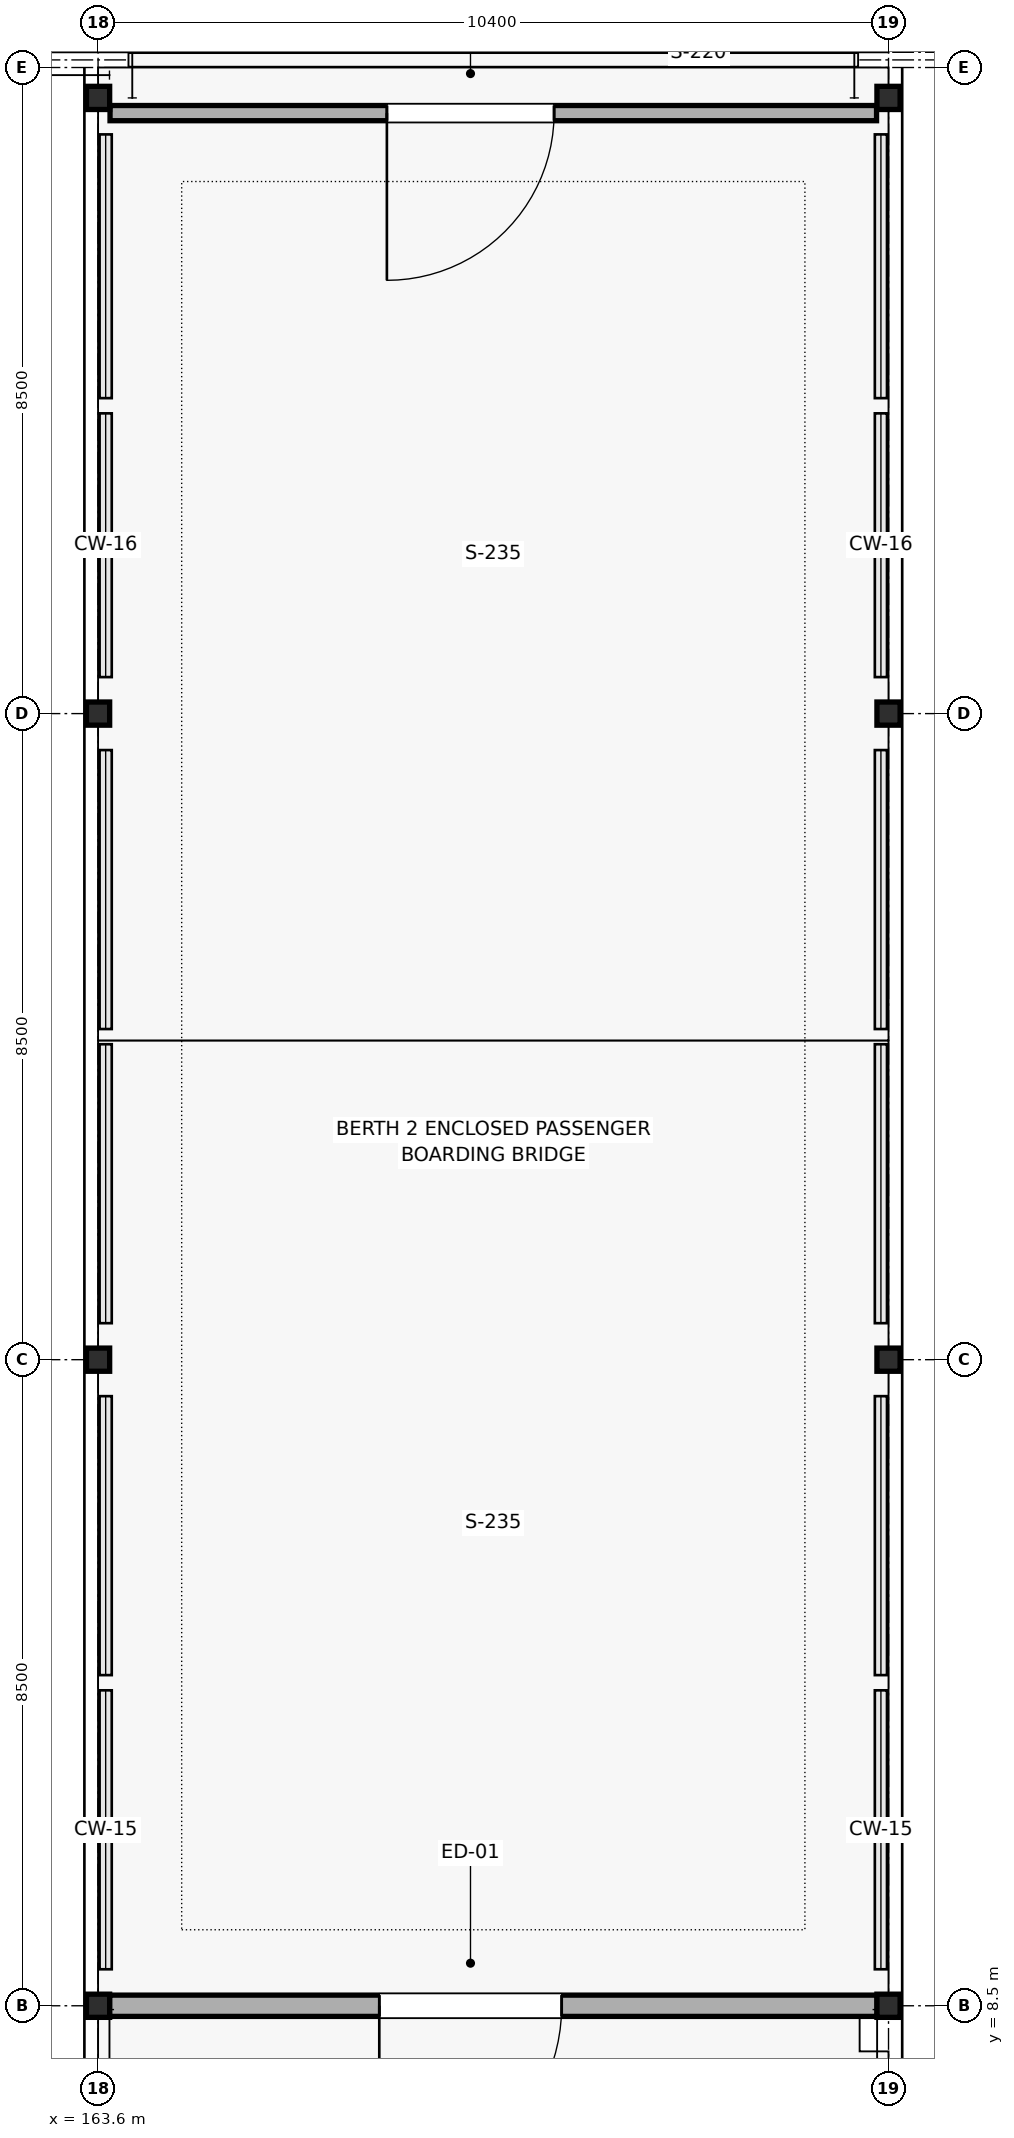
"""IFC4 building model, lengths in metres.
Left out: names, types, materials, properties, quantities, classifications, styles, units other than length and angle.
Written with IfcOpenShell. Run it as: python <this file> out.ifc"""

import sys

from ifc_helpers import new_model, si_unit, direction, frame, frame_2d, origin, origin_2d, place, context, subcontext, project, spatial, rectangle, hollow_rectangle, extrude, element, fill, save


model = new_model("IFC4")
c1 = context("Model", 3, precision=1e-05, world=origin(), true_north=direction((0.0, 1.0)))
c2 = subcontext(c1, "Body", "Model", "MODEL_VIEW")
j1 = project(units=[si_unit("LENGTHUNIT", "METRE"), si_unit("PLANEANGLEUNIT", "RADIAN")], contexts=[c1])
p1 = place(None, origin())
s1 = spatial("IfcSite", under=j1, at=p1, CompositionType="ELEMENT")
p2 = place(p1, origin())
s2 = spatial("IfcBuilding", under=s1, at=p2, CompositionType="ELEMENT")
p3 = place(p2, frame((0.0, 0.0, 5.4)))
s3 = spatial("IfcBuildingStorey", under=s2, at=p3, CompositionType="ELEMENT", Elevation=5.4)
for number, where, z_axis, x_axis in (
    (1, (163.6, 8.5, 0.0), (0.0, 0.0, 1.0), (1.0, 0.0, 0.0)),
    (2, (163.6, 17.0, 0.0), (0.0, 0.0, 1.0), (1.0, 0.0, 0.0)),
    (3, (163.6, 25.5, 0.0), (0.0, 0.0, 1.0), (1.0, 0.0, 0.0)),
    (4, (163.6, 33.6, 0.0), (0.0, 0.0, 1.0), (1.0, 0.0, 0.0)),
    (5, (174.0, 8.5, 0.0), (0.0, 0.0, 1.0), (1.0, 0.0, 0.0)),
    (6, (174.0, 17.0, 0.0), (0.0, 0.0, 1.0), (1.0, 0.0, 0.0)),
    (7, (174.0, 25.5, 0.0), (0.0, 0.0, 1.0), (1.0, 0.0, 0.0)),
    (8, (174.0, 33.6, 0.0), (0.0, 0.0, 1.0), (1.0, 0.0, 0.0)),
):
    element("IfcColumn", number, at=place(p3, frame(where, z_axis=z_axis, x_axis=x_axis)), inside=s3, PredefinedType="COLUMN", context=c2, shape_type="SweptSolid", body=[
        extrude(hollow_rectangle(XDim=0.305, YDim=0.305, WallThickness=0.012, InnerFilletRadius=0.012, OuterFilletRadius=0.024, at=origin_2d()), origin(), (0.0, 0.0, 1.0), 4.5),
    ])
p4 = place(p3, frame((163.75, 8.5, 0.0), z_axis=(0.0, 0.0, 1.0), x_axis=(1.0, 0.0, 0.0)))
e9 = element("IfcWall", 9, at=p4, inside=s3, PredefinedType="SOLIDWALL", context=c2, shape_type="SweptSolid", body=[
    extrude(rectangle(XDim=10.099, YDim=0.28, at=frame_2d((5.05, 0.0))), origin(), (0.0, 0.0, 1.0), 3.683),
])
p5 = place(p4, frame((3.55, 0.0, 0.0)))
e10 = element("IfcOpeningElement", 10, at=p5, cuts=e9, PredefinedType="OPENING", context=c2, shape_type="SweptSolid", body=[
    extrude(rectangle(XDim=2.4, YDim=2.6, at=frame_2d((1.2, 1.3))), frame((0.0, 0.15, 0.0), z_axis=(0.0, -1.0, 0.0), x_axis=(1.0, 0.0, 0.0)), (0.0, 0.0, 1.0), 0.3),
])
p6 = place(p3, frame((163.757, 33.4, 0.0), z_axis=(0.0, 0.0, 1.0), x_axis=(1.0, 0.0, 0.0)))
e11 = element("IfcWall", 11, at=p6, inside=s3, PredefinedType="PARTITIONING", context=c2, shape_type="SweptSolid", body=[
    extrude(rectangle(XDim=10.085, YDim=0.2, at=frame_2d((5.042, 0.0))), origin(), (0.0, 0.0, 1.0), 4.29),
])
p7 = place(p6, frame((3.643, 0.0, 0.0)))
e12 = element("IfcOpeningElement", 12, at=p7, cuts=e11, PredefinedType="OPENING", context=c2, shape_type="SweptSolid", body=[
    extrude(rectangle(XDim=2.2, YDim=2.5, at=frame_2d((1.1, 1.25))), frame((0.0, 0.11, 0.0), z_axis=(0.0, -1.0, 0.0), x_axis=(1.0, 0.0, 0.0)), (0.0, 0.0, 1.0), 0.22),
])
p8 = place(p5, frame((2.4, 0.0, 0.0), z_axis=(0.0, 0.0, 1.0), x_axis=(-1.0, 0.0, 0.0)))
e13 = element("IfcDoor", 13, at=p8, inside=s3, OperationType="SINGLE_SWING_RIGHT", PredefinedType="DOOR", context=c2, shape_type="SweptSolid", body=[
    extrude(rectangle(XDim=2.4, YDim=2.6, at=frame_2d((1.2, 1.3))), frame((0.0, 0.025, 0.0), z_axis=(0.0, -1.0, 0.0), x_axis=(1.0, 0.0, 0.0)), (0.0, 0.0, 1.0), 0.05),
])
fill(e10, e13)
p9 = place(p7, frame((2.2, 0.0, 0.0), z_axis=(0.0, 0.0, 1.0), x_axis=(-1.0, 0.0, 0.0)))
e14 = element("IfcDoor", 14, at=p9, inside=s3, OperationType="SINGLE_SWING_RIGHT", PredefinedType="DOOR", context=c2, shape_type="SweptSolid", body=[
    extrude(rectangle(XDim=2.2, YDim=2.5, at=frame_2d((1.1, 1.25))), frame((0.0, 0.025, 0.0), z_axis=(0.0, -1.0, 0.0), x_axis=(1.0, 0.0, 0.0)), (0.0, 0.0, 1.0), 0.05),
])
fill(e12, e14)
save(model, sys.argv[1])
